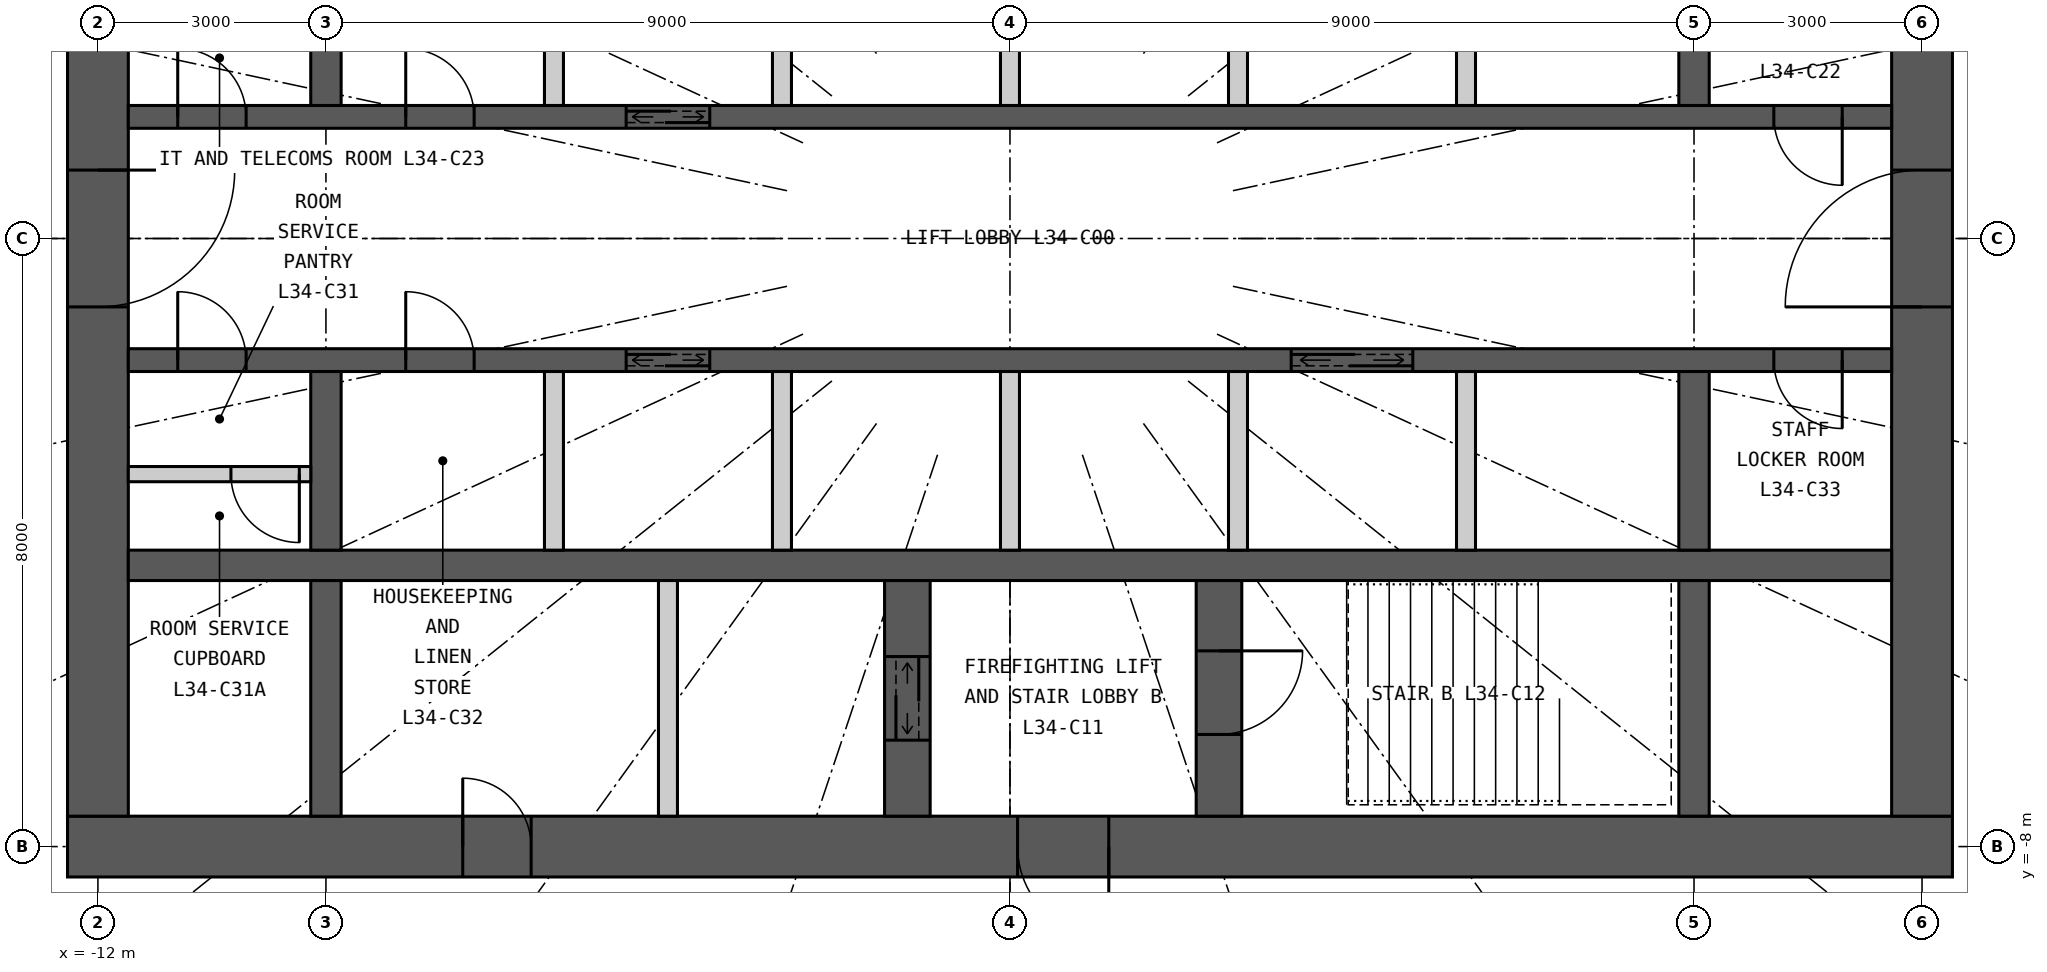
"""IFC4 building model, lengths in metres.
Left out: names, types, materials, properties, quantities, classifications, styles, units other than length and angle.
Written with IfcOpenShell. Run it as: python <this file> out.ifc"""

import sys

from ifc_helpers import new_model, si_unit, direction, frame, frame_2d, origin, place, context, subcontext, project, spatial, rectangle, extrude, element, fill, save


model = new_model("IFC4")
c1 = context("Model", 3, precision=1e-05, world=origin(), true_north=direction((0.0, 1.0)))
c2 = subcontext(c1, "Body", "Model", "MODEL_VIEW")
j1 = project(units=[si_unit("LENGTHUNIT", "METRE"), si_unit("PLANEANGLEUNIT", "RADIAN")], contexts=[c1])
p1 = place(None, origin())
s1 = spatial("IfcSite", under=j1, at=p1, CompositionType="ELEMENT")
p2 = place(p1, origin())
s2 = spatial("IfcBuilding", under=s1, at=p2, CompositionType="ELEMENT")
p3 = place(p2, frame((0.0, 0.0, 132.0)))
s3 = spatial("IfcBuildingStorey", under=s2, at=p3, CompositionType="ELEMENT", Elevation=132.0)
p4 = place(p3, frame((12.4, -8.0, 0.0), z_axis=(0.0, 0.0, 1.0), x_axis=(-1.0, 0.0, 0.0)))
e1 = element("IfcWall", 1, at=p4, inside=s3, PredefinedType="SHEAR", context=c2, shape_type="SweptSolid", body=[
    extrude(rectangle(XDim=24.8, YDim=0.8, at=frame_2d((12.4, 0.0))), origin(), (0.0, 0.0, 1.0), 3.3),
])
p5 = place(p4, frame((11.1, 0.0, 0.0)))
e2 = element("IfcOpeningElement", 2, at=p5, cuts=e1, PredefinedType="OPENING", context=c2, shape_type="SweptSolid", body=[
    extrude(rectangle(XDim=1.2, YDim=2.2, at=frame_2d((0.6, 1.1))), frame((0.0, 0.41, 0.0), z_axis=(0.0, -1.0, 0.0), x_axis=(1.0, 0.0, 0.0)), (0.0, 0.0, 1.0), 0.82),
])
p6 = place(p4, frame((18.7, 0.0, 0.0)))
e3 = element("IfcOpeningElement", 3, at=p6, cuts=e1, PredefinedType="OPENING", context=c2, shape_type="SweptSolid", body=[
    extrude(rectangle(XDim=0.9, YDim=2.2, at=frame_2d((0.45, 1.1))), frame((0.0, 0.41, 0.0), z_axis=(0.0, -1.0, 0.0), x_axis=(1.0, 0.0, 0.0)), (0.0, 0.0, 1.0), 0.82),
])
p7 = place(p3, frame((12.0, -7.6, 0.0), z_axis=(0.0, 0.0, 1.0), x_axis=(0.0, 1.0, 0.0)))
e4 = element("IfcWall", 4, at=p7, inside=s3, PredefinedType="SHEAR", context=c2, shape_type="SweptSolid", body=[
    extrude(rectangle(XDim=15.2, YDim=0.8, at=frame_2d((7.6, 0.0))), origin(), (0.0, 0.0, 1.0), 3.3),
])
p8 = place(p7, frame((6.7, 0.0, 0.0)))
e5 = element("IfcOpeningElement", 5, at=p8, cuts=e4, PredefinedType="OPENING", context=c2, shape_type="SweptSolid", body=[
    extrude(rectangle(XDim=1.8, YDim=2.2, at=frame_2d((0.9, 1.1))), frame((0.0, 0.41, 0.0), z_axis=(0.0, -1.0, 0.0), x_axis=(1.0, 0.0, 0.0)), (0.0, 0.0, 1.0), 0.82),
])
p9 = place(p3, frame((-12.0, 7.6, 0.0), z_axis=(0.0, 0.0, 1.0), x_axis=(0.0, -1.0, 0.0)))
e6 = element("IfcWall", 6, at=p9, inside=s3, PredefinedType="SHEAR", context=c2, shape_type="SweptSolid", body=[
    extrude(rectangle(XDim=15.2, YDim=0.8, at=frame_2d((7.6, 0.0))), origin(), (0.0, 0.0, 1.0), 3.3),
])
p10 = place(p9, frame((6.7, 0.0, 0.0)))
e7 = element("IfcOpeningElement", 7, at=p10, cuts=e6, PredefinedType="OPENING", context=c2, shape_type="SweptSolid", body=[
    extrude(rectangle(XDim=1.8, YDim=2.2, at=frame_2d((0.9, 1.1))), frame((0.0, 0.41, 0.0), z_axis=(0.0, -1.0, 0.0), x_axis=(1.0, 0.0, 0.0)), (0.0, 0.0, 1.0), 0.82),
])
p11 = place(p3, frame((-11.6, 1.6, 0.0), z_axis=(0.0, 0.0, 1.0), x_axis=(1.0, 0.0, 0.0)))
e8 = element("IfcWall", 8, at=p11, inside=s3, PredefinedType="SHEAR", context=c2, shape_type="SweptSolid", body=[
    extrude(rectangle(XDim=23.2, YDim=0.3, at=frame_2d((11.6, 0.0))), origin(), (0.0, 0.0, 1.0), 3.3),
])
p12 = place(p11, frame((6.55, 0.0, 0.0)))
e9 = element("IfcOpeningElement", 9, at=p12, cuts=e8, PredefinedType="OPENING", context=c2, shape_type="SweptSolid", body=[
    extrude(rectangle(XDim=1.1, YDim=2.2, at=frame_2d((0.55, 1.1))), frame((0.0, 0.16, 0.0), z_axis=(0.0, -1.0, 0.0), x_axis=(1.0, 0.0, 0.0)), (0.0, 0.0, 1.0), 0.32),
])
p13 = place(p11, frame((3.65, 0.0, 0.0)))
e10 = element("IfcOpeningElement", 10, at=p13, cuts=e8, PredefinedType="OPENING", context=c2, shape_type="SweptSolid", body=[
    extrude(rectangle(XDim=0.9, YDim=2.2, at=frame_2d((0.45, 1.1))), frame((0.0, 0.16, 0.0), z_axis=(0.0, -1.0, 0.0), x_axis=(1.0, 0.0, 0.0)), (0.0, 0.0, 1.0), 0.32),
])
p14 = place(p11, frame((21.65, 0.0, 0.0)))
e11 = element("IfcOpeningElement", 11, at=p14, cuts=e8, PredefinedType="OPENING", context=c2, shape_type="SweptSolid", body=[
    extrude(rectangle(XDim=0.9, YDim=2.2, at=frame_2d((0.45, 1.1))), frame((0.0, 0.16, 0.0), z_axis=(0.0, -1.0, 0.0), x_axis=(1.0, 0.0, 0.0)), (0.0, 0.0, 1.0), 0.32),
])
p15 = place(p11, frame((0.65, 0.0, 0.0)))
e12 = element("IfcOpeningElement", 12, at=p15, cuts=e8, PredefinedType="OPENING", context=c2, shape_type="SweptSolid", body=[
    extrude(rectangle(XDim=0.9, YDim=2.2, at=frame_2d((0.45, 1.1))), frame((0.0, 0.16, 0.0), z_axis=(0.0, -1.0, 0.0), x_axis=(1.0, 0.0, 0.0)), (0.0, 0.0, 1.0), 0.32),
])
p16 = place(p3, frame((-11.6, -4.3, 0.0), z_axis=(0.0, 0.0, 1.0), x_axis=(1.0, 0.0, 0.0)))
e13 = element("IfcWall", 13, at=p16, inside=s3, PredefinedType="SHEAR", context=c2, shape_type="SweptSolid", body=[
    extrude(rectangle(XDim=23.2, YDim=0.4, at=frame_2d((11.6, 0.0))), origin(), (0.0, 0.0, 1.0), 3.3),
])
p17 = place(p3, frame((-11.6, -1.6, 0.0), z_axis=(0.0, 0.0, 1.0), x_axis=(1.0, 0.0, 0.0)))
e14 = element("IfcWall", 14, at=p17, inside=s3, PredefinedType="SHEAR", context=c2, shape_type="SweptSolid", body=[
    extrude(rectangle(XDim=23.2, YDim=0.3, at=frame_2d((11.6, 0.0))), origin(), (0.0, 0.0, 1.0), 3.3),
])
p18 = place(p17, frame((6.55, 0.0, 0.0)))
e15 = element("IfcOpeningElement", 15, at=p18, cuts=e14, PredefinedType="OPENING", context=c2, shape_type="SweptSolid", body=[
    extrude(rectangle(XDim=1.1, YDim=2.2, at=frame_2d((0.55, 1.1))), frame((0.0, 0.16, 0.0), z_axis=(0.0, -1.0, 0.0), x_axis=(1.0, 0.0, 0.0)), (0.0, 0.0, 1.0), 0.32),
])
p19 = place(p17, frame((15.3, 0.0, 0.0)))
e16 = element("IfcOpeningElement", 16, at=p19, cuts=e14, PredefinedType="OPENING", context=c2, shape_type="SweptSolid", body=[
    extrude(rectangle(XDim=1.6, YDim=2.4, at=frame_2d((0.8, 1.2))), frame((0.0, 0.16, 0.0), z_axis=(0.0, -1.0, 0.0), x_axis=(1.0, 0.0, 0.0)), (0.0, 0.0, 1.0), 0.32),
])
p20 = place(p17, frame((0.65, 0.0, 0.0)))
e17 = element("IfcOpeningElement", 17, at=p20, cuts=e14, PredefinedType="OPENING", context=c2, shape_type="SweptSolid", body=[
    extrude(rectangle(XDim=0.9, YDim=2.2, at=frame_2d((0.45, 1.1))), frame((0.0, 0.16, 0.0), z_axis=(0.0, -1.0, 0.0), x_axis=(1.0, 0.0, 0.0)), (0.0, 0.0, 1.0), 0.32),
])
p21 = place(p17, frame((3.65, 0.0, 0.0)))
e18 = element("IfcOpeningElement", 18, at=p21, cuts=e14, PredefinedType="OPENING", context=c2, shape_type="SweptSolid", body=[
    extrude(rectangle(XDim=0.9, YDim=2.2, at=frame_2d((0.45, 1.1))), frame((0.0, 0.16, 0.0), z_axis=(0.0, -1.0, 0.0), x_axis=(1.0, 0.0, 0.0)), (0.0, 0.0, 1.0), 0.32),
])
p22 = place(p17, frame((21.65, 0.0, 0.0)))
e19 = element("IfcOpeningElement", 19, at=p22, cuts=e14, PredefinedType="OPENING", context=c2, shape_type="SweptSolid", body=[
    extrude(rectangle(XDim=0.9, YDim=2.2, at=frame_2d((0.45, 1.1))), frame((0.0, 0.16, 0.0), z_axis=(0.0, -1.0, 0.0), x_axis=(1.0, 0.0, 0.0)), (0.0, 0.0, 1.0), 0.32),
])
for number, where, z_axis, x_axis in (
    (20, (-9.0, 1.75, 0.0), (0.0, 0.0, 1.0), (0.0, 1.0, 0.0)),
    (21, (-9.0, -4.1, 0.0), (0.0, 0.0, 1.0), (0.0, 1.0, 0.0)),
):
    element("IfcWall", number, at=place(p3, frame(where, z_axis=z_axis, x_axis=x_axis)), inside=s3, PredefinedType="SHEAR", context=c2, shape_type="SweptSolid", body=[
        extrude(rectangle(XDim=2.35, YDim=0.4, at=frame_2d((1.175, 0.0))), origin(), (0.0, 0.0, 1.0), 3.3),
    ])
p23 = place(p3, frame((-9.0, -7.6, 0.0), z_axis=(0.0, 0.0, 1.0), x_axis=(0.0, 1.0, 0.0)))
e22 = element("IfcWall", 22, at=p23, inside=s3, PredefinedType="SHEAR", context=c2, shape_type="SweptSolid", body=[
    extrude(rectangle(XDim=3.1, YDim=0.4, at=frame_2d((1.55, 0.0))), origin(), (0.0, 0.0, 1.0), 3.3),
])
for number, where, z_axis, x_axis in (
    (23, (9.0, 1.75, 0.0), (0.0, 0.0, 1.0), (0.0, 1.0, 0.0)),
    (24, (9.0, -4.1, 0.0), (0.0, 0.0, 1.0), (0.0, 1.0, 0.0)),
):
    element("IfcWall", number, at=place(p3, frame(where, z_axis=z_axis, x_axis=x_axis)), inside=s3, PredefinedType="SHEAR", context=c2, shape_type="SweptSolid", body=[
        extrude(rectangle(XDim=2.35, YDim=0.4, at=frame_2d((1.175, 0.0))), origin(), (0.0, 0.0, 1.0), 3.3),
    ])
p24 = place(p3, frame((9.0, -7.6, 0.0), z_axis=(0.0, 0.0, 1.0), x_axis=(0.0, 1.0, 0.0)))
e25 = element("IfcWall", 25, at=p24, inside=s3, PredefinedType="SHEAR", context=c2, shape_type="SweptSolid", body=[
    extrude(rectangle(XDim=3.1, YDim=0.4, at=frame_2d((1.55, 0.0))), origin(), (0.0, 0.0, 1.0), 3.3),
])
p25 = place(p3, frame((2.75, -7.6, 0.0), z_axis=(0.0, 0.0, 1.0), x_axis=(0.0, 1.0, 0.0)))
e26 = element("IfcWall", 26, at=p25, inside=s3, PredefinedType="SHEAR", context=c2, shape_type="SweptSolid", body=[
    extrude(rectangle(XDim=3.1, YDim=0.6, at=frame_2d((1.55, 0.0))), origin(), (0.0, 0.0, 1.0), 3.3),
])
p26 = place(p25, frame((1.075, 0.0, 0.0)))
e27 = element("IfcOpeningElement", 27, at=p26, cuts=e26, PredefinedType="OPENING", context=c2, shape_type="SweptSolid", body=[
    extrude(rectangle(XDim=1.1, YDim=2.2, at=frame_2d((0.55, 1.1))), frame((0.0, 0.31, 0.0), z_axis=(0.0, -1.0, 0.0), x_axis=(1.0, 0.0, 0.0)), (0.0, 0.0, 1.0), 0.62),
])
p27 = place(p3, frame((-1.35, -7.6, 0.0), z_axis=(0.0, 0.0, 1.0), x_axis=(0.0, 1.0, 0.0)))
e28 = element("IfcWall", 28, at=p27, inside=s3, PredefinedType="SHEAR", context=c2, shape_type="SweptSolid", body=[
    extrude(rectangle(XDim=3.1, YDim=0.6, at=frame_2d((1.55, 0.0))), origin(), (0.0, 0.0, 1.0), 3.3),
])
p28 = place(p27, frame((1.0, 0.0, 0.0)))
e29 = element("IfcOpeningElement", 29, at=p28, cuts=e28, PredefinedType="OPENING", context=c2, shape_type="SweptSolid", body=[
    extrude(rectangle(XDim=1.1, YDim=2.2, at=frame_2d((0.55, 1.1))), frame((0.0, 0.31, 0.0), z_axis=(0.0, -1.0, 0.0), x_axis=(1.0, 0.0, 0.0)), (0.0, 0.0, 1.0), 0.62),
])
p29 = place(p3, frame((-4.5, -7.6, 0.0), z_axis=(0.0, 0.0, 1.0), x_axis=(0.0, 1.0, 0.0)))
e30 = element("IfcWall", 30, at=p29, inside=s3, PredefinedType="PARTITIONING", context=c2, shape_type="SweptSolid", body=[
    extrude(rectangle(XDim=3.1, YDim=0.25, at=frame_2d((1.55, 0.0))), origin(), (0.0, 0.0, 1.0), 3.3),
])
for number, where, z_axis, x_axis in (
    (31, (-6.0, 1.75, 0.0), (0.0, 0.0, 1.0), (0.0, 1.0, 0.0)),
    (32, (-3.0, 1.75, 0.0), (0.0, 0.0, 1.0), (0.0, 1.0, 0.0)),
    (33, (0.0, 1.75, 0.0), (0.0, 0.0, 1.0), (0.0, 1.0, 0.0)),
    (34, (3.0, 1.75, 0.0), (0.0, 0.0, 1.0), (0.0, 1.0, 0.0)),
    (35, (6.0, 1.75, 0.0), (0.0, 0.0, 1.0), (0.0, 1.0, 0.0)),
    (36, (-6.0, -4.1, 0.0), (0.0, 0.0, 1.0), (0.0, 1.0, 0.0)),
    (37, (-3.0, -4.1, 0.0), (0.0, 0.0, 1.0), (0.0, 1.0, 0.0)),
    (38, (0.0, -4.1, 0.0), (0.0, 0.0, 1.0), (0.0, 1.0, 0.0)),
    (39, (3.0, -4.1, 0.0), (0.0, 0.0, 1.0), (0.0, 1.0, 0.0)),
    (40, (6.0, -4.1, 0.0), (0.0, 0.0, 1.0), (0.0, 1.0, 0.0)),
):
    element("IfcWall", number, at=place(p3, frame(where, z_axis=z_axis, x_axis=x_axis)), inside=s3, PredefinedType="PARTITIONING", context=c2, shape_type="SweptSolid", body=[
        extrude(rectangle(XDim=2.35, YDim=0.25, at=frame_2d((1.175, 0.0))), origin(), (0.0, 0.0, 1.0), 3.3),
    ])
p30 = place(p3, frame((-11.6, -3.1, 0.0), z_axis=(0.0, 0.0, 1.0), x_axis=(1.0, 0.0, 0.0)))
e41 = element("IfcWall", 41, at=p30, inside=s3, PredefinedType="PARTITIONING", context=c2, shape_type="SweptSolid", body=[
    extrude(rectangle(XDim=2.4, YDim=0.2, at=frame_2d((1.2, 0.0))), origin(), (0.0, 0.0, 1.0), 3.12),
])
p31 = place(p30, frame((1.35, 0.0, 0.0)))
e42 = element("IfcOpeningElement", 42, at=p31, cuts=e41, PredefinedType="OPENING", context=c2, shape_type="SweptSolid", body=[
    extrude(rectangle(XDim=0.9, YDim=2.2, at=frame_2d((0.45, 1.1))), frame((0.0, 0.11, 0.0), z_axis=(0.0, -1.0, 0.0), x_axis=(1.0, 0.0, 0.0)), (0.0, 0.0, 1.0), 0.22),
])
p32 = place(p5, origin())
e43 = element("IfcDoor", 43, at=p32, inside=s3, OperationType="SINGLE_SWING_LEFT", PredefinedType="DOOR", context=c2, shape_type="SweptSolid", body=[
    extrude(rectangle(XDim=1.2, YDim=2.2, at=frame_2d((0.6, 1.1))), frame((0.0, 0.025, 0.0), z_axis=(0.0, -1.0, 0.0), x_axis=(1.0, 0.0, 0.0)), (0.0, 0.0, 1.0), 0.05),
])
fill(e2, e43)
p33 = place(p26, origin())
e44 = element("IfcDoor", 44, at=p33, inside=s3, OperationType="SINGLE_SWING_RIGHT", PredefinedType="DOOR", context=c2, shape_type="SweptSolid", body=[
    extrude(rectangle(XDim=1.1, YDim=2.2, at=frame_2d((0.55, 1.1))), frame((0.0, 0.025, 0.0), z_axis=(0.0, -1.0, 0.0), x_axis=(1.0, 0.0, 0.0)), (0.0, 0.0, 1.0), 0.05),
])
fill(e27, e44)
p34 = place(p28, origin())
e45 = element("IfcDoor", 45, at=p34, inside=s3, OperationType="DOUBLE_DOOR_SLIDING", PredefinedType="DOOR", context=c2, shape_type="SweptSolid", body=[
    extrude(rectangle(XDim=1.1, YDim=2.2, at=frame_2d((0.55, 1.1))), frame((0.0, 0.025, 0.0), z_axis=(0.0, -1.0, 0.0), x_axis=(1.0, 0.0, 0.0)), (0.0, 0.0, 1.0), 0.05),
])
fill(e29, e45)
p35 = place(p6, origin())
e46 = element("IfcDoor", 46, at=p35, inside=s3, OperationType="SINGLE_SWING_RIGHT", PredefinedType="DOOR", context=c2, shape_type="SweptSolid", body=[
    extrude(rectangle(XDim=0.9, YDim=2.2, at=frame_2d((0.45, 1.1))), frame((0.0, 0.025, 0.0), z_axis=(0.0, -1.0, 0.0), x_axis=(1.0, 0.0, 0.0)), (0.0, 0.0, 1.0), 0.05),
])
fill(e3, e46)
p36 = place(p12, origin())
e47 = element("IfcDoor", 47, at=p36, inside=s3, OperationType="DOUBLE_DOOR_SLIDING", PredefinedType="DOOR", context=c2, shape_type="SweptSolid", body=[
    extrude(rectangle(XDim=1.1, YDim=2.2, at=frame_2d((0.55, 1.1))), frame((0.0, 0.025, 0.0), z_axis=(0.0, -1.0, 0.0), x_axis=(1.0, 0.0, 0.0)), (0.0, 0.0, 1.0), 0.05),
])
fill(e9, e47)
p37 = place(p18, origin())
e48 = element("IfcDoor", 48, at=p37, inside=s3, OperationType="DOUBLE_DOOR_SLIDING", PredefinedType="DOOR", context=c2, shape_type="SweptSolid", body=[
    extrude(rectangle(XDim=1.1, YDim=2.2, at=frame_2d((0.55, 1.1))), frame((0.0, 0.025, 0.0), z_axis=(0.0, -1.0, 0.0), x_axis=(1.0, 0.0, 0.0)), (0.0, 0.0, 1.0), 0.05),
])
fill(e15, e48)
p38 = place(p19, origin())
e49 = element("IfcDoor", 49, at=p38, inside=s3, OperationType="DOUBLE_DOOR_SLIDING", PredefinedType="DOOR", context=c2, shape_type="SweptSolid", body=[
    extrude(rectangle(XDim=1.6, YDim=2.4, at=frame_2d((0.8, 1.2))), frame((0.0, 0.025, 0.0), z_axis=(0.0, -1.0, 0.0), x_axis=(1.0, 0.0, 0.0)), (0.0, 0.0, 1.0), 0.05),
])
fill(e16, e49)
p39 = place(p13, origin())
e50 = element("IfcDoor", 50, at=p39, inside=s3, OperationType="SINGLE_SWING_LEFT", PredefinedType="DOOR", context=c2, shape_type="SweptSolid", body=[
    extrude(rectangle(XDim=0.9, YDim=2.2, at=frame_2d((0.45, 1.1))), frame((0.0, 0.025, 0.0), z_axis=(0.0, -1.0, 0.0), x_axis=(1.0, 0.0, 0.0)), (0.0, 0.0, 1.0), 0.05),
])
fill(e10, e50)
p40 = place(p14, origin())
e51 = element("IfcDoor", 51, at=p40, inside=s3, OperationType="SINGLE_SWING_RIGHT", PredefinedType="DOOR", context=c2, shape_type="SweptSolid", body=[
    extrude(rectangle(XDim=0.9, YDim=2.2, at=frame_2d((0.45, 1.1))), frame((0.0, 0.025, 0.0), z_axis=(0.0, -1.0, 0.0), x_axis=(1.0, 0.0, 0.0)), (0.0, 0.0, 1.0), 0.05),
])
fill(e11, e51)
p41 = place(p31, origin())
e52 = element("IfcDoor", 52, at=p41, inside=s3, OperationType="SINGLE_SWING_RIGHT", PredefinedType="DOOR", context=c2, shape_type="SweptSolid", body=[
    extrude(rectangle(XDim=0.9, YDim=2.2, at=frame_2d((0.45, 1.1))), frame((0.0, 0.025, 0.0), z_axis=(0.0, -1.0, 0.0), x_axis=(1.0, 0.0, 0.0)), (0.0, 0.0, 1.0), 0.05),
])
fill(e42, e52)
p42 = place(p20, origin())
e53 = element("IfcDoor", 53, at=p42, inside=s3, OperationType="SINGLE_SWING_LEFT", PredefinedType="DOOR", context=c2, shape_type="SweptSolid", body=[
    extrude(rectangle(XDim=0.9, YDim=2.2, at=frame_2d((0.45, 1.1))), frame((0.0, 0.025, 0.0), z_axis=(0.0, -1.0, 0.0), x_axis=(1.0, 0.0, 0.0)), (0.0, 0.0, 1.0), 0.05),
])
fill(e17, e53)
p43 = place(p21, origin())
e54 = element("IfcDoor", 54, at=p43, inside=s3, OperationType="SINGLE_SWING_LEFT", PredefinedType="DOOR", context=c2, shape_type="SweptSolid", body=[
    extrude(rectangle(XDim=0.9, YDim=2.2, at=frame_2d((0.45, 1.1))), frame((0.0, 0.025, 0.0), z_axis=(0.0, -1.0, 0.0), x_axis=(1.0, 0.0, 0.0)), (0.0, 0.0, 1.0), 0.05),
])
fill(e18, e54)
p44 = place(p22, origin())
e55 = element("IfcDoor", 55, at=p44, inside=s3, OperationType="SINGLE_SWING_RIGHT", PredefinedType="DOOR", context=c2, shape_type="SweptSolid", body=[
    extrude(rectangle(XDim=0.9, YDim=2.2, at=frame_2d((0.45, 1.1))), frame((0.0, 0.025, 0.0), z_axis=(0.0, -1.0, 0.0), x_axis=(1.0, 0.0, 0.0)), (0.0, 0.0, 1.0), 0.05),
])
fill(e19, e55)
p45 = place(p15, origin())
e56 = element("IfcDoor", 56, at=p45, inside=s3, OperationType="SINGLE_SWING_LEFT", PredefinedType="DOOR", context=c2, shape_type="SweptSolid", body=[
    extrude(rectangle(XDim=0.9, YDim=2.2, at=frame_2d((0.45, 1.1))), frame((0.0, 0.025, 0.0), z_axis=(0.0, -1.0, 0.0), x_axis=(1.0, 0.0, 0.0)), (0.0, 0.0, 1.0), 0.05),
])
fill(e12, e56)
p46 = place(p8, origin())
e57 = element("IfcDoor", 57, at=p46, inside=s3, OperationType="DOUBLE_DOOR_DOUBLE_SWING", PredefinedType="DOOR", context=c2, shape_type="SweptSolid", body=[
    extrude(rectangle(XDim=1.8, YDim=2.2, at=frame_2d((0.9, 1.1))), frame((0.0, 0.025, 0.0), z_axis=(0.0, -1.0, 0.0), x_axis=(1.0, 0.0, 0.0)), (0.0, 0.0, 1.0), 0.05),
])
fill(e5, e57)
p47 = place(p10, origin())
e58 = element("IfcDoor", 58, at=p47, inside=s3, OperationType="DOUBLE_DOOR_DOUBLE_SWING", PredefinedType="DOOR", context=c2, shape_type="SweptSolid", body=[
    extrude(rectangle(XDim=1.8, YDim=2.2, at=frame_2d((0.9, 1.1))), frame((0.0, 0.025, 0.0), z_axis=(0.0, -1.0, 0.0), x_axis=(1.0, 0.0, 0.0)), (0.0, 0.0, 1.0), 0.05),
])
fill(e7, e58)
save(model, sys.argv[1])
